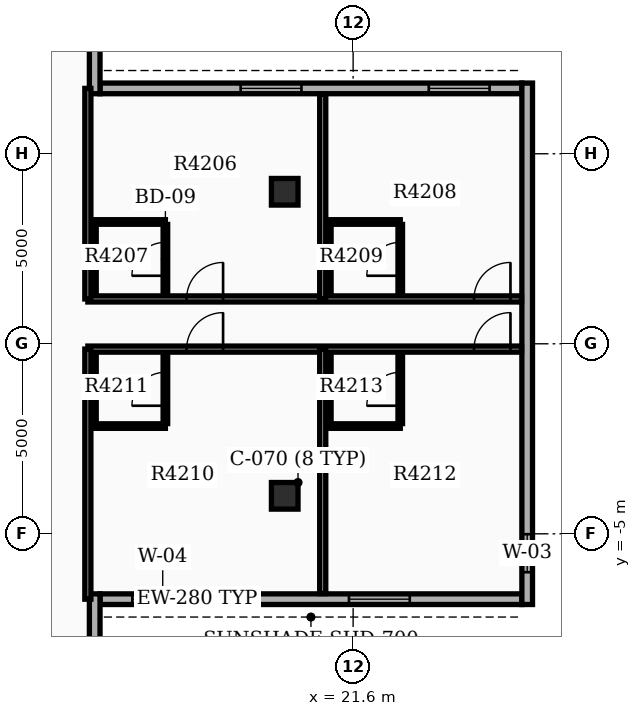
"""IFC4 building model, lengths in metres.
Left out: names, types, materials, properties, quantities, classifications, styles, units other than length and angle.
Written with IfcOpenShell. Run it as: python <this file> out.ifc"""

import sys

from ifc_helpers import new_model, si_unit, direction, frame, frame_2d, origin, origin_2d, place, context, subcontext, project, spatial, rectangle, extrude, element, fill, save


model = new_model("IFC4")
c1 = context("Model", 3, precision=1e-05, world=origin(), true_north=direction((0.0, 1.0)))
c2 = subcontext(c1, "Body", "Model", "MODEL_VIEW")
j1 = project(units=[si_unit("LENGTHUNIT", "METRE"), si_unit("PLANEANGLEUNIT", "RADIAN")], contexts=[c1])
p1 = place(None, origin())
s1 = spatial("IfcSite", under=j1, at=p1, CompositionType="ELEMENT")
p2 = place(p1, origin())
s2 = spatial("IfcBuilding", under=s1, at=p2, CompositionType="ELEMENT")
p3 = place(p2, frame((0.0, 0.0, 265.5)))
s3 = spatial("IfcBuildingStorey", under=s2, at=p3, CompositionType="ELEMENT", Elevation=265.5)
for number, where, z_axis, x_axis in (
    (1, (19.8, -4.0, 0.0), (0.0, 0.0, 1.0), (1.0, 0.0, 0.0)),
    (2, (19.8, 4.0, 0.0), (0.0, 0.0, 1.0), (1.0, 0.0, 0.0)),
):
    element("IfcColumn", number, at=place(p3, frame(where, z_axis=z_axis, x_axis=x_axis)), inside=s3, PredefinedType="COLUMN", context=c2, shape_type="SweptSolid", body=[
        extrude(rectangle(XDim=0.7, YDim=0.7, at=origin_2d()), origin(), (0.0, 0.0, 1.0), 3.9),
    ])
p4 = place(p3, frame((14.94, -6.72, 0.0), z_axis=(0.0, 0.0, 1.0), x_axis=(1.0, 0.0, 0.0)))
e3 = element("IfcWall", 3, at=p4, inside=s3, PredefinedType="STANDARD", context=c2, shape_type="SweptSolid", body=[
    extrude(rectangle(XDim=11.1, YDim=0.28, at=frame_2d((5.55, 0.0))), origin(), (0.0, 0.0, 1.0), 3.18),
])
p5 = place(p4, frame((0.85, 0.0, 0.8)))
e4 = element("IfcOpeningElement", 4, at=p5, cuts=e3, PredefinedType="OPENING", context=c2, shape_type="SweptSolid", body=[
    extrude(rectangle(XDim=1.6, YDim=1.7, at=frame_2d((0.8, 0.85))), frame((0.0, 0.15, 0.0), z_axis=(0.0, -1.0, 0.0), x_axis=(1.0, 0.0, 0.0)), (0.0, 0.0, 1.0), 0.3),
])
p6 = place(p4, frame((6.55, 0.0, 0.8)))
e5 = element("IfcOpeningElement", 5, at=p6, cuts=e3, PredefinedType="OPENING", context=c2, shape_type="SweptSolid", body=[
    extrude(rectangle(XDim=1.6, YDim=1.7, at=frame_2d((0.8, 0.85))), frame((0.0, 0.15, 0.0), z_axis=(0.0, -1.0, 0.0), x_axis=(1.0, 0.0, 0.0)), (0.0, 0.0, 1.0), 0.3),
])
p7 = place(p3, frame((26.04, 6.72, 0.0), z_axis=(0.0, 0.0, 1.0), x_axis=(-1.0, 0.0, 0.0)))
e6 = element("IfcWall", 6, at=p7, inside=s3, PredefinedType="STANDARD", context=c2, shape_type="SweptSolid", body=[
    extrude(rectangle(XDim=11.1, YDim=0.28, at=frame_2d((5.55, 0.0))), origin(), (0.0, 0.0, 1.0), 3.18),
])
p8 = place(p7, frame((0.85, 0.0, 0.8)))
e7 = element("IfcOpeningElement", 7, at=p8, cuts=e6, PredefinedType="OPENING", context=c2, shape_type="SweptSolid", body=[
    extrude(rectangle(XDim=1.6, YDim=1.7, at=frame_2d((0.8, 0.85))), frame((0.0, 0.15, 0.0), z_axis=(0.0, -1.0, 0.0), x_axis=(1.0, 0.0, 0.0)), (0.0, 0.0, 1.0), 0.3),
])
p9 = place(p7, frame((5.8, 0.0, 0.8)))
e8 = element("IfcOpeningElement", 8, at=p9, cuts=e6, PredefinedType="OPENING", context=c2, shape_type="SweptSolid", body=[
    extrude(rectangle(XDim=1.6, YDim=1.7, at=frame_2d((0.8, 0.85))), frame((0.0, 0.15, 0.0), z_axis=(0.0, -1.0, 0.0), x_axis=(1.0, 0.0, 0.0)), (0.0, 0.0, 1.0), 0.3),
])
p10 = place(p3, frame((26.18, -6.86, 0.0), z_axis=(0.0, 0.0, 1.0), x_axis=(0.0, 1.0, 0.0)))
e9 = element("IfcWall", 9, at=p10, inside=s3, PredefinedType="STANDARD", context=c2, shape_type="SweptSolid", body=[
    extrude(rectangle(XDim=13.72, YDim=0.28, at=frame_2d((6.86, 0.0))), origin(), (0.0, 0.0, 1.0), 3.18),
])
p11 = place(p10, frame((0.85, 0.0, 0.85)))
e10 = element("IfcOpeningElement", 10, at=p11, cuts=e9, PredefinedType="OPENING", context=c2, shape_type="SweptSolid", body=[
    extrude(rectangle(XDim=1.0, YDim=1.5, at=frame_2d((0.5, 0.75))), frame((0.0, 0.15, 0.0), z_axis=(0.0, -1.0, 0.0), x_axis=(1.0, 0.0, 0.0)), (0.0, 0.0, 1.0), 0.3),
])
for number, where, z_axis, x_axis in (
    (11, (14.8, 6.58, 0.0), (0.0, 0.0, 1.0), (0.0, 1.0, 0.0)),
    (12, (14.8, -6.58, 0.0), (0.0, 0.0, 1.0), (0.0, -1.0, 0.0)),
):
    element("IfcWall", number, at=place(p3, frame(where, z_axis=z_axis, x_axis=x_axis)), inside=s3, PredefinedType="STANDARD", context=c2, shape_type="SweptSolid", body=[
        extrude(rectangle(XDim=6.86, YDim=0.28, at=frame_2d((3.43, 0.0))), origin(), (0.0, 0.0, 1.0), 3.18),
    ])
p12 = place(p3, frame((14.62, 1.18, 0.0), z_axis=(0.0, 0.0, 1.0), x_axis=(1.0, 0.0, 0.0)))
e13 = element("IfcWall", 13, at=p12, inside=s3, PredefinedType="PARTITIONING", context=c2, shape_type="SweptSolid", body=[
    extrude(rectangle(XDim=11.412, YDim=0.16, at=frame_2d((5.706, 0.0))), origin(), (0.0, 0.0, 1.0), 3.17),
])
p13 = place(p12, frame((2.598, 0.0, 0.0)))
e14 = element("IfcOpeningElement", 14, at=p13, cuts=e13, PredefinedType="OPENING", context=c2, shape_type="SweptSolid", body=[
    extrude(rectangle(XDim=0.96, YDim=2.15, at=frame_2d((0.48, 1.075))), frame((0.0, 0.09, 0.0), z_axis=(0.0, -1.0, 0.0), x_axis=(1.0, 0.0, 0.0)), (0.0, 0.0, 1.0), 0.18),
])
p14 = place(p12, frame((10.16, 0.0, 0.0)))
e15 = element("IfcOpeningElement", 15, at=p14, cuts=e13, PredefinedType="OPENING", context=c2, shape_type="SweptSolid", body=[
    extrude(rectangle(XDim=0.96, YDim=2.15, at=frame_2d((0.48, 1.075))), frame((0.0, 0.09, 0.0), z_axis=(0.0, -1.0, 0.0), x_axis=(1.0, 0.0, 0.0)), (0.0, 0.0, 1.0), 0.18),
])
p15 = place(p3, frame((14.62, 1.18, 0.0), z_axis=(0.0, 0.0, 1.0), x_axis=(0.0, 1.0, 0.0)))
e16 = element("IfcWall", 16, at=p15, inside=s3, PredefinedType="PARTITIONING", context=c2, shape_type="SweptSolid", body=[
    extrude(rectangle(XDim=5.54, YDim=0.16, at=frame_2d((2.77, 0.0))), origin(), (0.0, 0.0, 1.0), 3.17),
])
p16 = place(p3, frame((20.8, 1.18, 0.0), z_axis=(0.0, 0.0, 1.0), x_axis=(0.0, 1.0, 0.0)))
e17 = element("IfcWall", 17, at=p16, inside=s3, PredefinedType="PARTITIONING", context=c2, shape_type="SweptSolid", body=[
    extrude(rectangle(XDim=5.392, YDim=0.16, at=frame_2d((2.696, 0.0))), origin(), (0.0, 0.0, 1.0), 3.17),
])
p17 = place(p3, frame((16.66, 1.32, 0.0), z_axis=(0.0, 0.0, 1.0), x_axis=(0.0, 1.0, 0.0)))
e18 = element("IfcWall", 18, at=p17, inside=s3, PredefinedType="PARTITIONING", context=c2, shape_type="SweptSolid", body=[
    extrude(rectangle(XDim=1.82, YDim=0.12, at=frame_2d((0.91, 0.0))), origin(), (0.0, 0.0, 1.0), 3.17),
])
p18 = place(p17, frame((0.47, 0.0, 0.0)))
e19 = element("IfcOpeningElement", 19, at=p18, cuts=e18, PredefinedType="OPENING", context=c2, shape_type="SweptSolid", body=[
    extrude(rectangle(XDim=0.88, YDim=2.1, at=frame_2d((0.44, 1.05))), frame((0.0, 0.07, 0.0), z_axis=(0.0, -1.0, 0.0), x_axis=(1.0, 0.0, 0.0)), (0.0, 0.0, 1.0), 0.14),
])
p19 = place(p3, frame((14.78, 1.32, 0.0), z_axis=(0.0, 0.0, 1.0), x_axis=(0.0, 1.0, 0.0)))
e20 = element("IfcWall", 20, at=p19, inside=s3, PredefinedType="PARTITIONING", context=c2, shape_type="SweptSolid", body=[
    extrude(rectangle(XDim=1.82, YDim=0.12, at=frame_2d((0.91, 0.0))), origin(), (0.0, 0.0, 1.0), 3.17),
])
p20 = place(p3, frame((14.78, 3.205, 0.0), z_axis=(0.0, 0.0, 1.0), x_axis=(1.0, 0.0, 0.0)))
e21 = element("IfcWall", 21, at=p20, inside=s3, PredefinedType="PARTITIONING", context=c2, shape_type="SweptSolid", body=[
    extrude(rectangle(XDim=1.88, YDim=0.12, at=frame_2d((0.94, 0.0))), origin(), (0.0, 0.0, 1.0), 3.17),
])
p21 = place(p3, frame((22.84, 1.32, 0.0), z_axis=(0.0, 0.0, 1.0), x_axis=(0.0, 1.0, 0.0)))
e22 = element("IfcWall", 22, at=p21, inside=s3, PredefinedType="PARTITIONING", context=c2, shape_type="SweptSolid", body=[
    extrude(rectangle(XDim=1.82, YDim=0.12, at=frame_2d((0.91, 0.0))), origin(), (0.0, 0.0, 1.0), 3.17),
])
p22 = place(p21, frame((0.47, 0.0, 0.0)))
e23 = element("IfcOpeningElement", 23, at=p22, cuts=e22, PredefinedType="OPENING", context=c2, shape_type="SweptSolid", body=[
    extrude(rectangle(XDim=0.88, YDim=2.1, at=frame_2d((0.44, 1.05))), frame((0.0, 0.07, 0.0), z_axis=(0.0, -1.0, 0.0), x_axis=(1.0, 0.0, 0.0)), (0.0, 0.0, 1.0), 0.14),
])
p23 = place(p3, frame((20.96, 1.32, 0.0), z_axis=(0.0, 0.0, 1.0), x_axis=(0.0, 1.0, 0.0)))
e24 = element("IfcWall", 24, at=p23, inside=s3, PredefinedType="PARTITIONING", context=c2, shape_type="SweptSolid", body=[
    extrude(rectangle(XDim=1.82, YDim=0.12, at=frame_2d((0.91, 0.0))), origin(), (0.0, 0.0, 1.0), 3.17),
])
p24 = place(p3, frame((20.96, 3.205, 0.0), z_axis=(0.0, 0.0, 1.0), x_axis=(1.0, 0.0, 0.0)))
e25 = element("IfcWall", 25, at=p24, inside=s3, PredefinedType="PARTITIONING", context=c2, shape_type="SweptSolid", body=[
    extrude(rectangle(XDim=1.88, YDim=0.12, at=frame_2d((0.94, 0.0))), origin(), (0.0, 0.0, 1.0), 3.17),
])
p25 = place(p3, frame((14.62, -0.14, 0.0), z_axis=(0.0, 0.0, 1.0), x_axis=(1.0, 0.0, 0.0)))
e26 = element("IfcWall", 26, at=p25, inside=s3, PredefinedType="PARTITIONING", context=c2, shape_type="SweptSolid", body=[
    extrude(rectangle(XDim=11.412, YDim=0.16, at=frame_2d((5.706, 0.0))), origin(), (0.0, 0.0, 1.0), 3.17),
])
p26 = place(p25, frame((2.598, 0.0, 0.0)))
e27 = element("IfcOpeningElement", 27, at=p26, cuts=e26, PredefinedType="OPENING", context=c2, shape_type="SweptSolid", body=[
    extrude(rectangle(XDim=0.96, YDim=2.15, at=frame_2d((0.48, 1.075))), frame((0.0, 0.09, 0.0), z_axis=(0.0, -1.0, 0.0), x_axis=(1.0, 0.0, 0.0)), (0.0, 0.0, 1.0), 0.18),
])
p27 = place(p25, frame((10.16, 0.0, 0.0)))
e28 = element("IfcOpeningElement", 28, at=p27, cuts=e26, PredefinedType="OPENING", context=c2, shape_type="SweptSolid", body=[
    extrude(rectangle(XDim=0.96, YDim=2.15, at=frame_2d((0.48, 1.075))), frame((0.0, 0.09, 0.0), z_axis=(0.0, -1.0, 0.0), x_axis=(1.0, 0.0, 0.0)), (0.0, 0.0, 1.0), 0.18),
])
p28 = place(p3, frame((14.62, -0.14, 0.0), z_axis=(0.0, 0.0, 1.0), x_axis=(0.0, -1.0, 0.0)))
e29 = element("IfcWall", 29, at=p28, inside=s3, PredefinedType="PARTITIONING", context=c2, shape_type="SweptSolid", body=[
    extrude(rectangle(XDim=6.58, YDim=0.16, at=frame_2d((3.29, 0.0))), origin(), (0.0, 0.0, 1.0), 3.17),
])
p29 = place(p3, frame((20.8, -0.14, 0.0), z_axis=(0.0, 0.0, 1.0), x_axis=(0.0, -1.0, 0.0)))
e30 = element("IfcWall", 30, at=p29, inside=s3, PredefinedType="PARTITIONING", context=c2, shape_type="SweptSolid", body=[
    extrude(rectangle(XDim=6.432, YDim=0.16, at=frame_2d((3.216, 0.0))), origin(), (0.0, 0.0, 1.0), 3.17),
])
p30 = place(p3, frame((16.66, -2.1, 0.0), z_axis=(0.0, 0.0, 1.0), x_axis=(0.0, 1.0, 0.0)))
e31 = element("IfcWall", 31, at=p30, inside=s3, PredefinedType="PARTITIONING", context=c2, shape_type="SweptSolid", body=[
    extrude(rectangle(XDim=1.82, YDim=0.12, at=frame_2d((0.91, 0.0))), origin(), (0.0, 0.0, 1.0), 3.17),
])
p31 = place(p30, frame((0.47, 0.0, 0.0)))
e32 = element("IfcOpeningElement", 32, at=p31, cuts=e31, PredefinedType="OPENING", context=c2, shape_type="SweptSolid", body=[
    extrude(rectangle(XDim=0.88, YDim=2.1, at=frame_2d((0.44, 1.05))), frame((0.0, 0.07, 0.0), z_axis=(0.0, -1.0, 0.0), x_axis=(1.0, 0.0, 0.0)), (0.0, 0.0, 1.0), 0.14),
])
p32 = place(p3, frame((14.78, -2.1, 0.0), z_axis=(0.0, 0.0, 1.0), x_axis=(0.0, 1.0, 0.0)))
e33 = element("IfcWall", 33, at=p32, inside=s3, PredefinedType="PARTITIONING", context=c2, shape_type="SweptSolid", body=[
    extrude(rectangle(XDim=1.82, YDim=0.12, at=frame_2d((0.91, 0.0))), origin(), (0.0, 0.0, 1.0), 3.17),
])
p33 = place(p3, frame((14.78, -2.165, 0.0), z_axis=(0.0, 0.0, 1.0), x_axis=(1.0, 0.0, 0.0)))
e34 = element("IfcWall", 34, at=p33, inside=s3, PredefinedType="PARTITIONING", context=c2, shape_type="SweptSolid", body=[
    extrude(rectangle(XDim=1.88, YDim=0.12, at=frame_2d((0.94, 0.0))), origin(), (0.0, 0.0, 1.0), 3.17),
])
p34 = place(p3, frame((22.84, -2.1, 0.0), z_axis=(0.0, 0.0, 1.0), x_axis=(0.0, 1.0, 0.0)))
e35 = element("IfcWall", 35, at=p34, inside=s3, PredefinedType="PARTITIONING", context=c2, shape_type="SweptSolid", body=[
    extrude(rectangle(XDim=1.82, YDim=0.12, at=frame_2d((0.91, 0.0))), origin(), (0.0, 0.0, 1.0), 3.17),
])
p35 = place(p34, frame((0.47, 0.0, 0.0)))
e36 = element("IfcOpeningElement", 36, at=p35, cuts=e35, PredefinedType="OPENING", context=c2, shape_type="SweptSolid", body=[
    extrude(rectangle(XDim=0.88, YDim=2.1, at=frame_2d((0.44, 1.05))), frame((0.0, 0.07, 0.0), z_axis=(0.0, -1.0, 0.0), x_axis=(1.0, 0.0, 0.0)), (0.0, 0.0, 1.0), 0.14),
])
p36 = place(p3, frame((20.96, -2.1, 0.0), z_axis=(0.0, 0.0, 1.0), x_axis=(0.0, 1.0, 0.0)))
e37 = element("IfcWall", 37, at=p36, inside=s3, PredefinedType="PARTITIONING", context=c2, shape_type="SweptSolid", body=[
    extrude(rectangle(XDim=1.82, YDim=0.12, at=frame_2d((0.91, 0.0))), origin(), (0.0, 0.0, 1.0), 3.17),
])
p37 = place(p3, frame((20.96, -2.165, 0.0), z_axis=(0.0, 0.0, 1.0), x_axis=(1.0, 0.0, 0.0)))
e38 = element("IfcWall", 38, at=p37, inside=s3, PredefinedType="PARTITIONING", context=c2, shape_type="SweptSolid", body=[
    extrude(rectangle(XDim=1.88, YDim=0.12, at=frame_2d((0.94, 0.0))), origin(), (0.0, 0.0, 1.0), 3.17),
])
p38 = place(p5, origin())
e39 = element("IfcWindow", 39, at=p38, inside=s3, PartitioningType="SINGLE_PANEL", PredefinedType="WINDOW", context=c2, shape_type="SweptSolid", body=[
    extrude(rectangle(XDim=1.6, YDim=1.7, at=frame_2d((0.8, 0.85))), frame((0.0, 0.03, 0.0), z_axis=(0.0, -1.0, 0.0), x_axis=(1.0, 0.0, 0.0)), (0.0, 0.0, 1.0), 0.06),
])
fill(e4, e39)
p39 = place(p6, origin())
e40 = element("IfcWindow", 40, at=p39, inside=s3, PartitioningType="SINGLE_PANEL", PredefinedType="WINDOW", context=c2, shape_type="SweptSolid", body=[
    extrude(rectangle(XDim=1.6, YDim=1.7, at=frame_2d((0.8, 0.85))), frame((0.0, 0.03, 0.0), z_axis=(0.0, -1.0, 0.0), x_axis=(1.0, 0.0, 0.0)), (0.0, 0.0, 1.0), 0.06),
])
fill(e5, e40)
p40 = place(p8, origin())
e41 = element("IfcWindow", 41, at=p40, inside=s3, PartitioningType="SINGLE_PANEL", PredefinedType="WINDOW", context=c2, shape_type="SweptSolid", body=[
    extrude(rectangle(XDim=1.6, YDim=1.7, at=frame_2d((0.8, 0.85))), frame((0.0, 0.03, 0.0), z_axis=(0.0, -1.0, 0.0), x_axis=(1.0, 0.0, 0.0)), (0.0, 0.0, 1.0), 0.06),
])
fill(e7, e41)
p41 = place(p9, origin())
e42 = element("IfcWindow", 42, at=p41, inside=s3, PartitioningType="SINGLE_PANEL", PredefinedType="WINDOW", context=c2, shape_type="SweptSolid", body=[
    extrude(rectangle(XDim=1.6, YDim=1.7, at=frame_2d((0.8, 0.85))), frame((0.0, 0.03, 0.0), z_axis=(0.0, -1.0, 0.0), x_axis=(1.0, 0.0, 0.0)), (0.0, 0.0, 1.0), 0.06),
])
fill(e8, e42)
p42 = place(p11, origin())
e43 = element("IfcWindow", 43, at=p42, inside=s3, PartitioningType="SINGLE_PANEL", PredefinedType="WINDOW", context=c2, shape_type="SweptSolid", body=[
    extrude(rectangle(XDim=1.0, YDim=1.5, at=frame_2d((0.5, 0.75))), frame((0.0, 0.03, 0.0), z_axis=(0.0, -1.0, 0.0), x_axis=(1.0, 0.0, 0.0)), (0.0, 0.0, 1.0), 0.06),
])
fill(e10, e43)
p43 = place(p13, origin())
e44 = element("IfcDoor", 44, at=p43, inside=s3, OperationType="SINGLE_SWING_RIGHT", PredefinedType="DOOR", context=c2, shape_type="SweptSolid", body=[
    extrude(rectangle(XDim=0.96, YDim=2.15, at=frame_2d((0.48, 1.075))), frame((0.0, 0.025, 0.0), z_axis=(0.0, -1.0, 0.0), x_axis=(1.0, 0.0, 0.0)), (0.0, 0.0, 1.0), 0.05),
])
fill(e14, e44)
p44 = place(p18, origin())
e45 = element("IfcDoor", 45, at=p44, inside=s3, OperationType="SINGLE_SWING_LEFT", PredefinedType="DOOR", context=c2, shape_type="SweptSolid", body=[
    extrude(rectangle(XDim=0.88, YDim=2.1, at=frame_2d((0.44, 1.05))), frame((0.0, 0.025, 0.0), z_axis=(0.0, -1.0, 0.0), x_axis=(1.0, 0.0, 0.0)), (0.0, 0.0, 1.0), 0.05),
])
fill(e19, e45)
p45 = place(p14, origin())
e46 = element("IfcDoor", 46, at=p45, inside=s3, OperationType="SINGLE_SWING_RIGHT", PredefinedType="DOOR", context=c2, shape_type="SweptSolid", body=[
    extrude(rectangle(XDim=0.96, YDim=2.15, at=frame_2d((0.48, 1.075))), frame((0.0, 0.025, 0.0), z_axis=(0.0, -1.0, 0.0), x_axis=(1.0, 0.0, 0.0)), (0.0, 0.0, 1.0), 0.05),
])
fill(e15, e46)
p46 = place(p22, origin())
e47 = element("IfcDoor", 47, at=p46, inside=s3, OperationType="SINGLE_SWING_LEFT", PredefinedType="DOOR", context=c2, shape_type="SweptSolid", body=[
    extrude(rectangle(XDim=0.88, YDim=2.1, at=frame_2d((0.44, 1.05))), frame((0.0, 0.025, 0.0), z_axis=(0.0, -1.0, 0.0), x_axis=(1.0, 0.0, 0.0)), (0.0, 0.0, 1.0), 0.05),
])
fill(e23, e47)
p47 = place(p26, origin())
e48 = element("IfcDoor", 48, at=p47, inside=s3, OperationType="SINGLE_SWING_RIGHT", PredefinedType="DOOR", context=c2, shape_type="SweptSolid", body=[
    extrude(rectangle(XDim=0.96, YDim=2.15, at=frame_2d((0.48, 1.075))), frame((0.0, 0.025, 0.0), z_axis=(0.0, -1.0, 0.0), x_axis=(1.0, 0.0, 0.0)), (0.0, 0.0, 1.0), 0.05),
])
fill(e27, e48)
p48 = place(p31, origin())
e49 = element("IfcDoor", 49, at=p48, inside=s3, OperationType="SINGLE_SWING_LEFT", PredefinedType="DOOR", context=c2, shape_type="SweptSolid", body=[
    extrude(rectangle(XDim=0.88, YDim=2.1, at=frame_2d((0.44, 1.05))), frame((0.0, 0.025, 0.0), z_axis=(0.0, -1.0, 0.0), x_axis=(1.0, 0.0, 0.0)), (0.0, 0.0, 1.0), 0.05),
])
fill(e32, e49)
p49 = place(p27, origin())
e50 = element("IfcDoor", 50, at=p49, inside=s3, OperationType="SINGLE_SWING_RIGHT", PredefinedType="DOOR", context=c2, shape_type="SweptSolid", body=[
    extrude(rectangle(XDim=0.96, YDim=2.15, at=frame_2d((0.48, 1.075))), frame((0.0, 0.025, 0.0), z_axis=(0.0, -1.0, 0.0), x_axis=(1.0, 0.0, 0.0)), (0.0, 0.0, 1.0), 0.05),
])
fill(e28, e50)
p50 = place(p35, origin())
e51 = element("IfcDoor", 51, at=p50, inside=s3, OperationType="SINGLE_SWING_LEFT", PredefinedType="DOOR", context=c2, shape_type="SweptSolid", body=[
    extrude(rectangle(XDim=0.88, YDim=2.1, at=frame_2d((0.44, 1.05))), frame((0.0, 0.025, 0.0), z_axis=(0.0, -1.0, 0.0), x_axis=(1.0, 0.0, 0.0)), (0.0, 0.0, 1.0), 0.05),
])
fill(e36, e51)
save(model, sys.argv[1])
